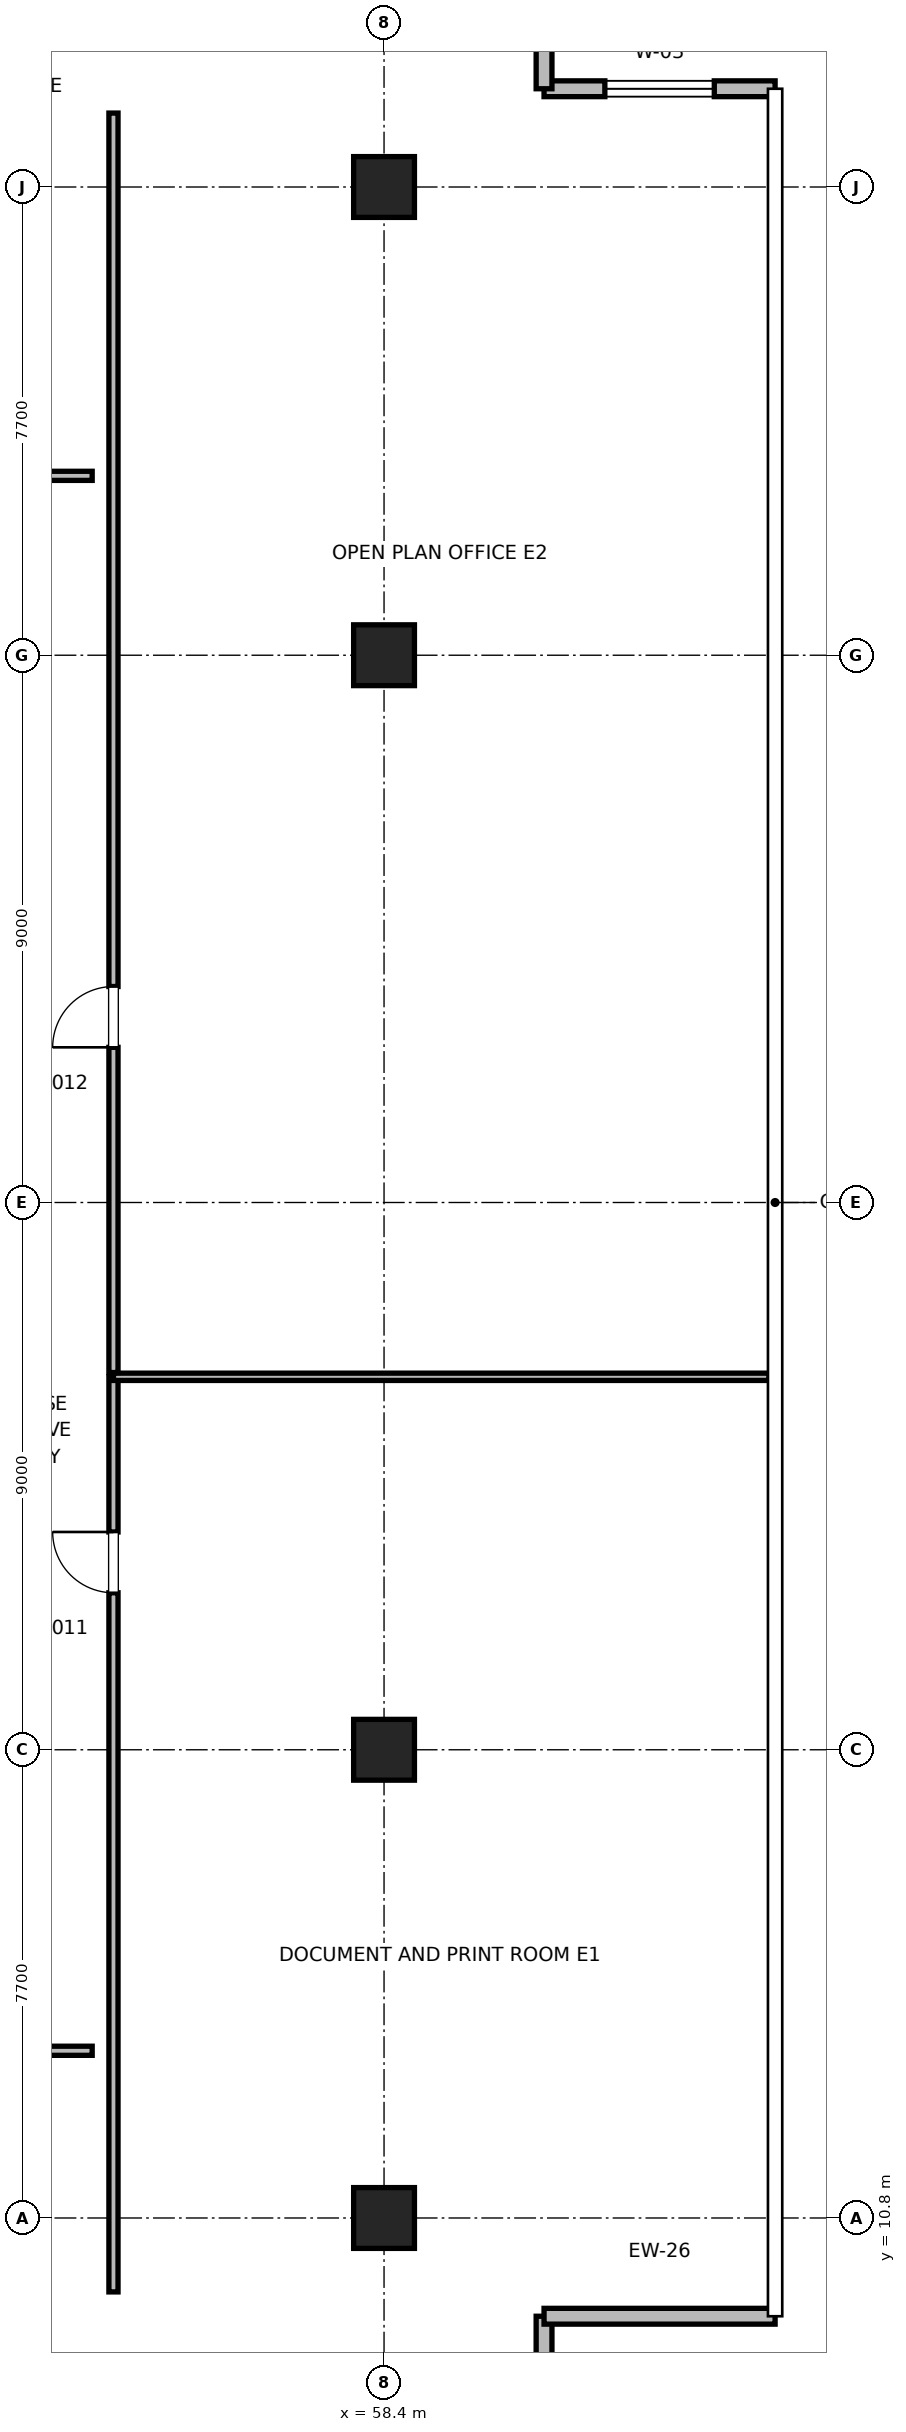
"""IFC4 building model, lengths in metres.
Left out: names, types, materials, properties, quantities, classifications, styles, units other than length and angle.
Written with IfcOpenShell. Run it as: python <this file> out.ifc"""

import sys

from ifc_helpers import new_model, si_unit, direction, frame, frame_2d, origin, origin_2d, place, context, subcontext, project, spatial, rectangle, extrude, element, fill, save


model = new_model("IFC4")
c1 = context("Model", 3, precision=1e-05, world=origin(), true_north=direction((0.0, 1.0)))
c2 = subcontext(c1, "Body", "Model", "MODEL_VIEW")
j1 = project(units=[si_unit("LENGTHUNIT", "METRE"), si_unit("PLANEANGLEUNIT", "RADIAN")], contexts=[c1])
p1 = place(None, origin())
s1 = spatial("IfcSite", under=j1, at=p1, CompositionType="ELEMENT")
p2 = place(p1, origin())
s2 = spatial("IfcBuilding", under=s1, at=p2, CompositionType="ELEMENT")
p3 = place(p2, frame((0.0, 0.0, 318.8)))
s3 = spatial("IfcBuildingStorey", under=s2, at=p3, CompositionType="ELEMENT", Elevation=318.8)
for number, where, z_axis, x_axis in (
    (1, (58.4, 18.5, 0.0), (0.0, 0.0, 1.0), (1.0, 0.0, 0.0)),
    (2, (58.4, 36.5, 0.0), (0.0, 0.0, 1.0), (1.0, 0.0, 0.0)),
    (3, (58.4, 10.8, 0.0), (0.0, 0.0, 1.0), (1.0, 0.0, 0.0)),
    (4, (58.4, 44.2, 0.0), (0.0, 0.0, 1.0), (1.0, 0.0, 0.0)),
):
    element("IfcColumn", number, at=place(p3, frame(where, z_axis=z_axis, x_axis=x_axis)), inside=s3, PredefinedType="COLUMN", context=c2, shape_type="SweptSolid", body=[
        extrude(rectangle(XDim=1.0, YDim=1.0, at=origin_2d()), origin(), (0.0, 0.0, 1.0), 4.0),
    ])
p4 = place(p3, frame((61.031, 5.884, 0.0), z_axis=(0.0, 0.0, 1.0), x_axis=(0.0, 1.0, 0.0)))
e5 = element("IfcWall", 5, at=p4, inside=s3, PredefinedType="PARAPET", context=c2, shape_type="SweptSolid", body=[
    extrude(rectangle(XDim=3.3, YDim=0.26, at=frame_2d((1.65, 0.0))), origin(), (0.0, 0.0, 1.0), 3.785),
])
p5 = place(p4, frame((0.75, 0.0, 0.85)))
e6 = element("IfcOpeningElement", 6, at=p5, cuts=e5, PredefinedType="OPENING", context=c2, shape_type="SweptSolid", body=[
    extrude(rectangle(XDim=1.8, YDim=2.2, at=frame_2d((0.9, 1.1))), frame((0.0, 0.13, 0.0), z_axis=(0.0, -1.0, 0.0), x_axis=(1.0, 0.0, 0.0)), (0.0, 0.0, 1.0), 0.26),
])
p6 = place(p3, frame((61.031, 9.184, 0.0), z_axis=(0.0, 0.0, 1.0), x_axis=(1.0, 0.0, 0.0)))
e7 = element("IfcWall", 7, at=p6, inside=s3, PredefinedType="PARAPET", context=c2, shape_type="SweptSolid", body=[
    extrude(rectangle(XDim=3.8, YDim=0.26, at=frame_2d((1.9, 0.0))), origin(), (0.0, 0.0, 1.0), 3.785),
])
p7 = place(p3, frame((64.832, 45.816, 0.0), z_axis=(0.0, 0.0, 1.0), x_axis=(-1.0, 0.0, 0.0)))
e8 = element("IfcWall", 8, at=p7, inside=s3, PredefinedType="PARAPET", context=c2, shape_type="SweptSolid", body=[
    extrude(rectangle(XDim=3.8, YDim=0.26, at=frame_2d((1.9, 0.0))), origin(), (0.0, 0.0, 1.0), 3.785),
])
p8 = place(p7, frame((1.0, 0.0, 0.85)))
e9 = element("IfcOpeningElement", 9, at=p8, cuts=e8, PredefinedType="OPENING", context=c2, shape_type="SweptSolid", body=[
    extrude(rectangle(XDim=1.8, YDim=2.2, at=frame_2d((0.9, 1.1))), frame((0.0, 0.13, 0.0), z_axis=(0.0, -1.0, 0.0), x_axis=(1.0, 0.0, 0.0)), (0.0, 0.0, 1.0), 0.26),
])
p9 = place(p3, frame((61.031, 45.816, 0.0), z_axis=(0.0, 0.0, 1.0), x_axis=(0.0, 1.0, 0.0)))
e10 = element("IfcWall", 10, at=p9, inside=s3, PredefinedType="PARAPET", context=c2, shape_type="SweptSolid", body=[
    extrude(rectangle(XDim=3.3, YDim=0.26, at=frame_2d((1.65, 0.0))), origin(), (0.0, 0.0, 1.0), 3.785),
])
p10 = place(p3, frame((49.59, 39.45, 0.0), z_axis=(0.0, 0.0, 1.0), x_axis=(1.0, 0.0, 0.0)))
e11 = element("IfcWall", 11, at=p10, inside=s3, PredefinedType="PARTITIONING", context=c2, shape_type="SweptSolid", body=[
    extrude(rectangle(XDim=4.01, YDim=0.15, at=frame_2d((2.005, 0.0))), origin(), (0.0, 0.0, 1.0), 2.85),
])
p11 = place(p10, frame((1.455, 0.0, 0.0)))
e12 = element("IfcOpeningElement", 12, at=p11, cuts=e11, PredefinedType="OPENING", context=c2, shape_type="SweptSolid", body=[
    extrude(rectangle(XDim=1.0, YDim=2.15, at=frame_2d((0.5, 1.075))), frame((0.0, 0.075, 0.0), z_axis=(0.0, -1.0, 0.0), x_axis=(1.0, 0.0, 0.0)), (0.0, 0.0, 1.0), 0.15),
])
p12 = place(p3, frame((44.694, 13.55, 0.0), z_axis=(0.0, 0.0, 1.0), x_axis=(1.0, 0.0, 0.0)))
e13 = element("IfcWall", 13, at=p12, inside=s3, PredefinedType="PARTITIONING", context=c2, shape_type="SweptSolid", body=[
    extrude(rectangle(XDim=8.906, YDim=0.15, at=frame_2d((4.453, 0.0))), origin(), (0.0, 0.0, 1.0), 2.85),
])
p13 = place(p12, frame((3.903, 0.0, 0.0)))
e14 = element("IfcOpeningElement", 14, at=p13, cuts=e13, PredefinedType="OPENING", context=c2, shape_type="SweptSolid", body=[
    extrude(rectangle(XDim=1.0, YDim=2.15, at=frame_2d((0.5, 1.075))), frame((0.0, 0.075, 0.0), z_axis=(0.0, -1.0, 0.0), x_axis=(1.0, 0.0, 0.0)), (0.0, 0.0, 1.0), 0.15),
])
p14 = place(p3, frame((53.95, 9.584, 0.0), z_axis=(0.0, 0.0, 1.0), x_axis=(0.0, 1.0, 0.0)))
e15 = element("IfcWall", 15, at=p14, inside=s3, PredefinedType="PARTITIONING", context=c2, shape_type="SweptSolid", body=[
    extrude(rectangle(XDim=15.049, YDim=0.15, at=frame_2d((7.525, 0.0))), origin(), (0.0, 0.0, 1.0), 2.85),
])
p15 = place(p14, frame((11.497, 0.0, 0.0)))
e16 = element("IfcOpeningElement", 16, at=p15, cuts=e15, PredefinedType="OPENING", context=c2, shape_type="SweptSolid", body=[
    extrude(rectangle(XDim=1.0, YDim=2.15, at=frame_2d((0.5, 1.075))), frame((0.0, 0.075, 0.0), z_axis=(0.0, -1.0, 0.0), x_axis=(1.0, 0.0, 0.0)), (0.0, 0.0, 1.0), 0.15),
])
p16 = place(p3, frame((53.95, 24.634, 0.0), z_axis=(0.0, 0.0, 1.0), x_axis=(1.0, 0.0, 0.0)))
e17 = element("IfcWall", 17, at=p16, inside=s3, PredefinedType="PARTITIONING", context=c2, shape_type="SweptSolid", body=[
    extrude(rectangle(XDim=10.781, YDim=0.12, at=frame_2d((5.391, 0.0))), origin(), (0.0, 0.0, 1.0), 2.85),
])
p17 = place(p3, frame((53.95, 24.704, 0.0), z_axis=(0.0, 0.0, 1.0), x_axis=(0.0, 1.0, 0.0)))
e18 = element("IfcWall", 18, at=p17, inside=s3, PredefinedType="PARTITIONING", context=c2, shape_type="SweptSolid", body=[
    extrude(rectangle(XDim=20.712, YDim=0.15, at=frame_2d((10.356, 0.0))), origin(), (0.0, 0.0, 1.0), 2.85),
])
p18 = place(p17, frame((5.348, 0.0, 0.0)))
e19 = element("IfcOpeningElement", 19, at=p18, cuts=e18, PredefinedType="OPENING", context=c2, shape_type="SweptSolid", body=[
    extrude(rectangle(XDim=1.0, YDim=2.15, at=frame_2d((0.5, 1.075))), frame((0.0, 0.075, 0.0), z_axis=(0.0, -1.0, 0.0), x_axis=(1.0, 0.0, 0.0)), (0.0, 0.0, 1.0), 0.15),
])
p19 = place(p8, origin())
e20 = element("IfcWindow", 20, at=p19, inside=s3, PartitioningType="SINGLE_PANEL", PredefinedType="WINDOW", context=c2, shape_type="SweptSolid", body=[
    extrude(rectangle(XDim=1.8, YDim=2.2, at=frame_2d((0.9, 1.1))), frame((0.0, 0.03, 0.0), z_axis=(0.0, -1.0, 0.0), x_axis=(1.0, 0.0, 0.0)), (0.0, 0.0, 1.0), 0.06),
])
fill(e9, e20)
p20 = place(p15, origin())
e21 = element("IfcDoor", 21, at=p20, inside=s3, OperationType="SINGLE_SWING_RIGHT", PredefinedType="DOOR", context=c2, shape_type="SweptSolid", body=[
    extrude(rectangle(XDim=1.0, YDim=2.15, at=frame_2d((0.5, 1.075))), frame((0.0, 0.025, 0.0), z_axis=(0.0, -1.0, 0.0), x_axis=(1.0, 0.0, 0.0)), (0.0, 0.0, 1.0), 0.05),
])
fill(e16, e21)
p21 = place(p18, origin())
e22 = element("IfcDoor", 22, at=p21, inside=s3, OperationType="SINGLE_SWING_LEFT", PredefinedType="DOOR", context=c2, shape_type="SweptSolid", body=[
    extrude(rectangle(XDim=1.0, YDim=2.15, at=frame_2d((0.5, 1.075))), frame((0.0, 0.025, 0.0), z_axis=(0.0, -1.0, 0.0), x_axis=(1.0, 0.0, 0.0)), (0.0, 0.0, 1.0), 0.05),
])
fill(e19, e22)
save(model, sys.argv[1])
